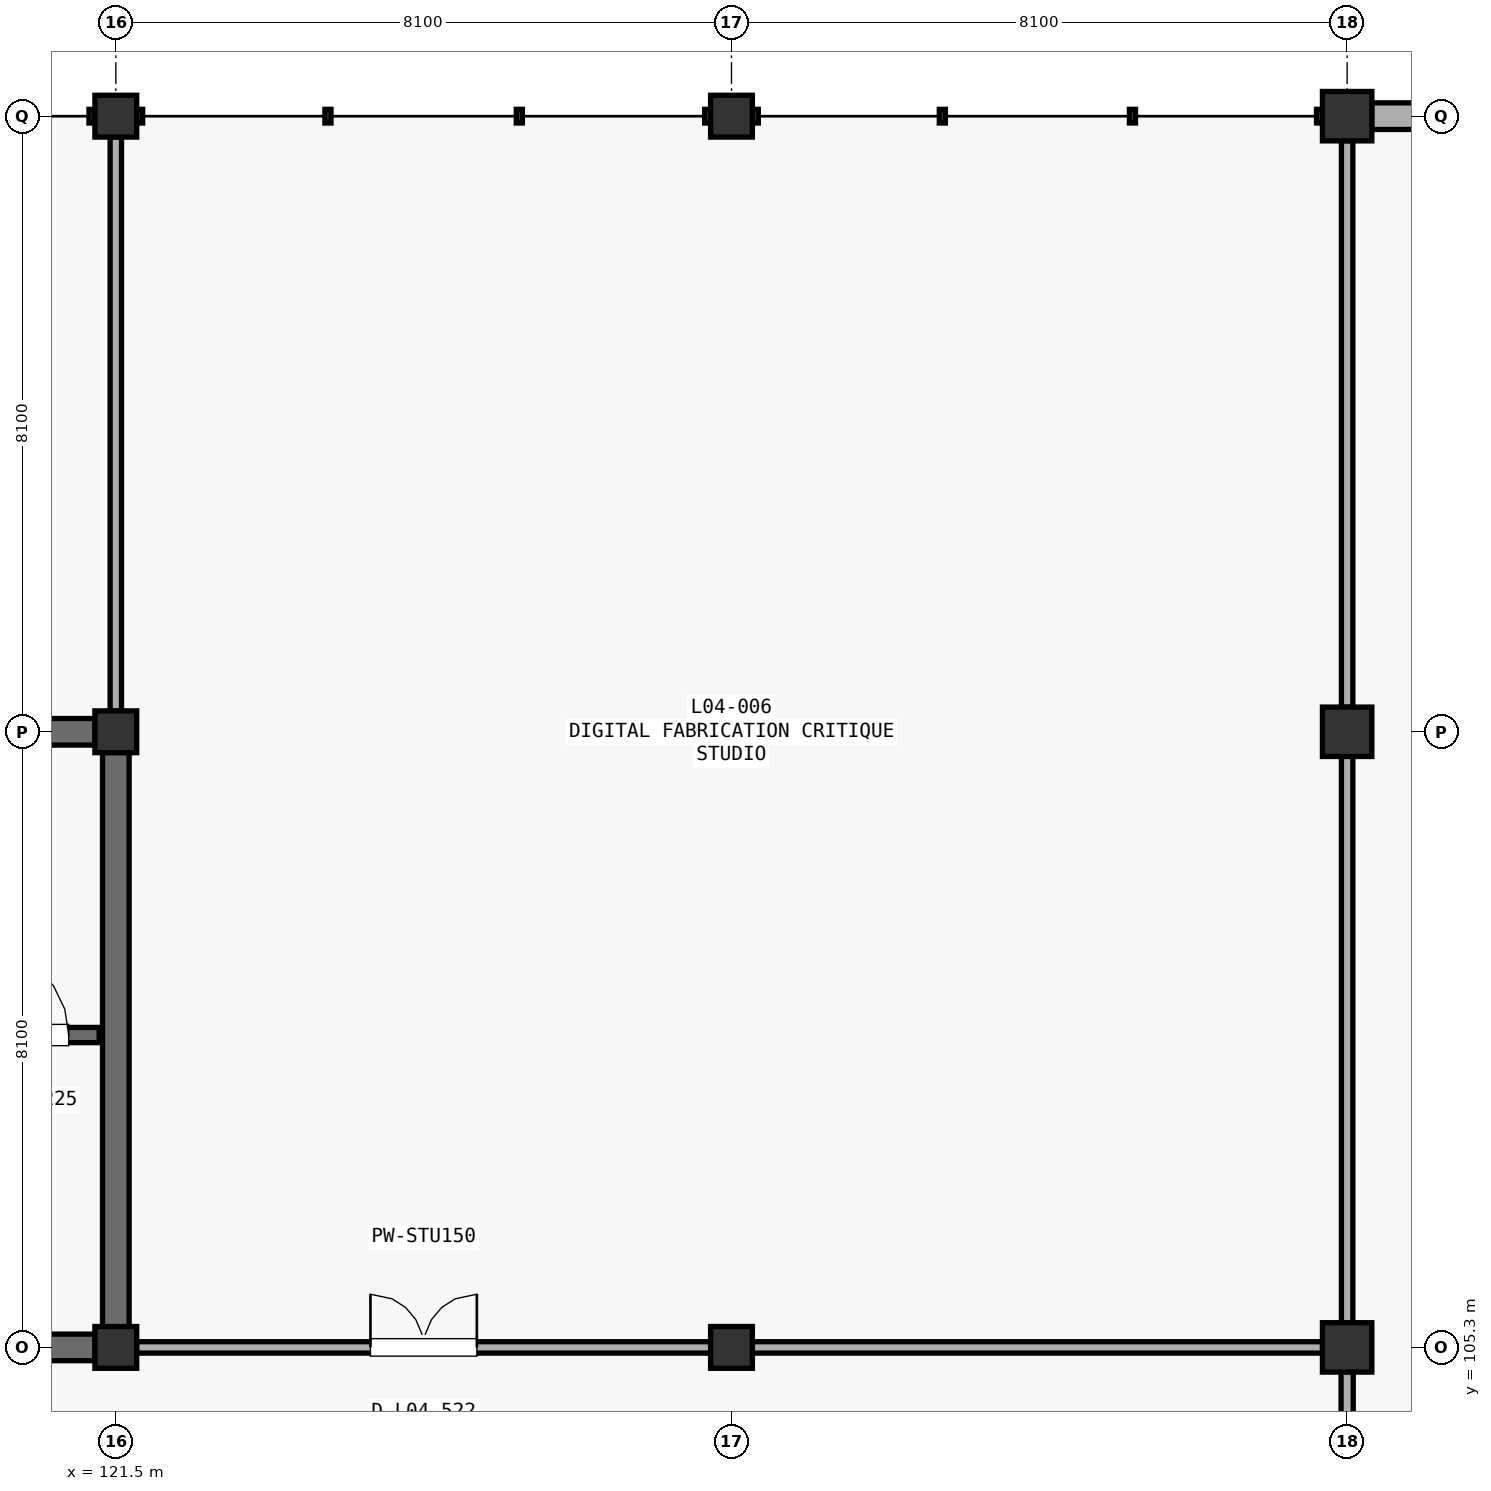
"""IFC4 building model, lengths in metres.
Left out: names, types, materials, properties, quantities, classifications, styles, units other than length and angle.
Written with IfcOpenShell. Run it as: python <this file> out.ifc"""

import sys

from ifc_helpers import new_model, si_unit, direction, frame, frame_2d, origin, origin_2d, place, context, subcontext, project, spatial, rectangle, extrude, element, fill, save


model = new_model("IFC4")
c1 = context("Model", 3, precision=1e-05, world=origin(), true_north=direction((0.0, 1.0)))
c2 = subcontext(c1, "Body", "Model", "MODEL_VIEW")
j1 = project(units=[si_unit("LENGTHUNIT", "METRE"), si_unit("PLANEANGLEUNIT", "RADIAN")], contexts=[c1])
p1 = place(None, origin())
s1 = spatial("IfcSite", under=j1, at=p1, CompositionType="ELEMENT")
p2 = place(p1, origin())
s2 = spatial("IfcBuilding", under=s1, at=p2, CompositionType="ELEMENT")
p3 = place(p2, frame((0.0, 0.0, 18.53)))
s3 = spatial("IfcBuildingStorey", under=s2, at=p3, CompositionType="ELEMENT", Elevation=18.53)
for number, where, z_axis, x_axis in (
    (1, (121.5, 105.3, 0.0), (0.0, 0.0, 1.0), (1.0, 0.0, 0.0)),
    (2, (121.5, 113.4, 0.0), (0.0, 0.0, 1.0), (1.0, 0.0, 0.0)),
    (3, (121.5, 121.5, 0.0), (0.0, 0.0, 1.0), (1.0, 0.0, 0.0)),
    (4, (129.6, 105.3, 0.0), (0.0, 0.0, 1.0), (1.0, 0.0, 0.0)),
    (5, (129.6, 113.4, 0.0), (0.0, 0.0, 1.0), (1.0, 0.0, 0.0)),
    (6, (129.6, 121.5, 0.0), (0.0, 0.0, 1.0), (1.0, 0.0, 0.0)),
):
    element("IfcColumn", number, at=place(p3, frame(where, z_axis=z_axis, x_axis=x_axis)), inside=s3, PredefinedType="COLUMN", context=c2, shape_type="SweptSolid", body=[
        extrude(rectangle(XDim=0.55, YDim=0.55, at=origin_2d()), origin(), (0.0, 0.0, 1.0), 4.42),
    ])
for number, where, z_axis, x_axis in (
    (7, (137.7, 105.3, 0.0), (0.0, 0.0, 1.0), (1.0, 0.0, 0.0)),
    (8, (137.7, 113.4, 0.0), (0.0, 0.0, 1.0), (1.0, 0.0, 0.0)),
    (9, (137.7, 121.5, 0.0), (0.0, 0.0, 1.0), (1.0, 0.0, 0.0)),
):
    element("IfcColumn", number, at=place(p3, frame(where, z_axis=z_axis, x_axis=x_axis)), inside=s3, PredefinedType="COLUMN", context=c2, shape_type="SweptSolid", body=[
        extrude(rectangle(XDim=0.65, YDim=0.65, at=origin_2d()), origin(), (0.0, 0.0, 1.0), 4.42),
    ])
p4 = place(p3, frame((138.023, 121.5, 0.0), z_axis=(0.0, 0.0, 1.0), x_axis=(1.0, 0.0, 0.0)))
e10 = element("IfcWall", 10, at=p4, inside=s3, PredefinedType="STANDARD", context=c2, shape_type="SweptSolid", body=[
    extrude(rectangle(XDim=7.454, YDim=0.35, at=frame_2d((3.727, 0.0))), origin(), (0.0, 0.0, 1.0), 3.562),
])
p5 = place(p4, frame((2.077, 0.0, 0.85)))
e11 = element("IfcOpeningElement", 11, at=p5, cuts=e10, PredefinedType="OPENING", context=c2, shape_type="SweptSolid", body=[
    extrude(rectangle(XDim=3.3, YDim=1.8, at=frame_2d((1.65, 0.9))), frame((0.0, 0.185, 0.0), z_axis=(0.0, -1.0, 0.0), x_axis=(1.0, 0.0, 0.0)), (0.0, 0.0, 1.0), 0.37),
])
for number, where, z_axis, x_axis in (
    (12, (113.673, 113.4, 0.0), (0.0, 0.0, 1.0), (1.0, 0.0, 0.0)),
    (13, (121.5, 105.573, 0.0), (0.0, 0.0, 1.0), (0.0, 1.0, 0.0)),
):
    element("IfcWall", number, at=place(p3, frame(where, z_axis=z_axis, x_axis=x_axis)), inside=s3, PredefinedType="SHEAR", context=c2, shape_type="SweptSolid", body=[
        extrude(rectangle(XDim=7.554, YDim=0.35, at=frame_2d((3.777, 0.0))), origin(), (0.0, 0.0, 1.0), 4.162),
    ])
p6 = place(p3, frame((113.673, 105.3, 0.0), z_axis=(0.0, 0.0, 1.0), x_axis=(1.0, 0.0, 0.0)))
e14 = element("IfcWall", 14, at=p6, inside=s3, PredefinedType="SHEAR", context=c2, shape_type="SweptSolid", body=[
    extrude(rectangle(XDim=7.554, YDim=0.35, at=frame_2d((3.777, 0.0))), origin(), (0.0, 0.0, 1.0), 4.162),
])
p7 = place(p6, frame((5.304, 0.0, 0.0)))
e15 = element("IfcOpeningElement", 15, at=p7, cuts=e14, PredefinedType="OPENING", context=c2, shape_type="SweptSolid", body=[
    extrude(rectangle(XDim=1.2, YDim=2.2, at=frame_2d((0.6, 1.1))), frame((0.0, 0.185, 0.0), z_axis=(0.0, -1.0, 0.0), x_axis=(1.0, 0.0, 0.0)), (0.0, 0.0, 1.0), 0.37),
])
p8 = place(p3, frame((113.62, 109.41, 0.0), z_axis=(0.0, 0.0, 1.0), x_axis=(1.0, 0.0, 0.0)))
e16 = element("IfcWall", 16, at=p8, inside=s3, PredefinedType="SHEAR", context=c2, shape_type="SweptSolid", body=[
    extrude(rectangle(XDim=7.66, YDim=0.2, at=frame_2d((3.83, 0.0))), origin(), (0.0, 0.0, 1.0), 4.162),
])
p9 = place(p8, frame((6.11, 0.0, 0.0)))
e17 = element("IfcOpeningElement", 17, at=p9, cuts=e16, PredefinedType="OPENING", context=c2, shape_type="SweptSolid", body=[
    extrude(rectangle(XDim=1.15, YDim=2.2, at=frame_2d((0.575, 1.1))), frame((0.0, 0.11, 0.0), z_axis=(0.0, -1.0, 0.0), x_axis=(1.0, 0.0, 0.0)), (0.0, 0.0, 1.0), 0.22),
])
p10 = place(p3, frame((121.773, 105.3, 0.0), z_axis=(0.0, 0.0, 1.0), x_axis=(1.0, 0.0, 0.0)))
e18 = element("IfcWall", 18, at=p10, inside=s3, PredefinedType="PARTITIONING", context=c2, shape_type="SweptSolid", body=[
    extrude(rectangle(XDim=7.554, YDim=0.15, at=frame_2d((3.777, 0.0))), origin(), (0.0, 0.0, 1.0), 3.312),
])
p11 = place(p10, frame((3.077, 0.0, 0.0)))
e19 = element("IfcOpeningElement", 19, at=p11, cuts=e18, PredefinedType="OPENING", context=c2, shape_type="SweptSolid", body=[
    extrude(rectangle(XDim=1.4, YDim=2.2, at=frame_2d((0.7, 1.1))), frame((0.0, 0.085, 0.0), z_axis=(0.0, -1.0, 0.0), x_axis=(1.0, 0.0, 0.0)), (0.0, 0.0, 1.0), 0.17),
])
p12 = place(p3, frame((129.873, 105.3, 0.0), z_axis=(0.0, 0.0, 1.0), x_axis=(1.0, 0.0, 0.0)))
e20 = element("IfcWall", 20, at=p12, inside=s3, PredefinedType="PARTITIONING", context=c2, shape_type="SweptSolid", body=[
    extrude(rectangle(XDim=7.504, YDim=0.15, at=frame_2d((3.752, 0.0))), origin(), (0.0, 0.0, 1.0), 3.212),
])
p13 = place(p3, frame((137.7, 105.623, 0.0), z_axis=(0.0, 0.0, 1.0), x_axis=(0.0, 1.0, 0.0)))
e21 = element("IfcWall", 21, at=p13, inside=s3, PredefinedType="PARTITIONING", context=c2, shape_type="SweptSolid", body=[
    extrude(rectangle(XDim=7.454, YDim=0.15, at=frame_2d((3.727, 0.0))), origin(), (0.0, 0.0, 1.0), 3.562),
])
p14 = place(p3, frame((137.7, 113.723, 0.0), z_axis=(0.0, 0.0, 1.0), x_axis=(0.0, 1.0, 0.0)))
e22 = element("IfcWall", 22, at=p14, inside=s3, PredefinedType="PARTITIONING", context=c2, shape_type="SweptSolid", body=[
    extrude(rectangle(XDim=7.454, YDim=0.15, at=frame_2d((3.727, 0.0))), origin(), (0.0, 0.0, 1.0), 3.312),
])
p15 = place(p3, frame((121.5, 113.673, 0.0), z_axis=(0.0, 0.0, 1.0), x_axis=(0.0, 1.0, 0.0)))
e23 = element("IfcWall", 23, at=p15, inside=s3, PredefinedType="PARTITIONING", context=c2, shape_type="SweptSolid", body=[
    extrude(rectangle(XDim=7.554, YDim=0.15, at=frame_2d((3.777, 0.0))), origin(), (0.0, 0.0, 1.0), 3.212),
])
p16 = place(p3, frame((137.7, 97.523, 0.0), z_axis=(0.0, 0.0, 1.0), x_axis=(0.0, 1.0, 0.0)))
e24 = element("IfcWall", 24, at=p16, inside=s3, PredefinedType="PARTITIONING", context=c2, shape_type="SweptSolid", body=[
    extrude(rectangle(XDim=7.454, YDim=0.16, at=frame_2d((3.727, 0.0))), origin(), (0.0, 0.0, 1.0), 3.512),
])
p17 = place(p9, origin())
e25 = element("IfcDoor", 25, at=p17, inside=s3, OperationType="SINGLE_SWING_LEFT", PredefinedType="DOOR", context=c2, shape_type="SweptSolid", body=[
    extrude(rectangle(XDim=1.15, YDim=2.2, at=frame_2d((0.575, 1.1))), frame((0.0, 0.025, 0.0), z_axis=(0.0, -1.0, 0.0), x_axis=(1.0, 0.0, 0.0)), (0.0, 0.0, 1.0), 0.05),
])
fill(e17, e25)
p18 = place(p11, origin())
e26 = element("IfcDoor", 26, at=p18, inside=s3, OperationType="DOUBLE_SWING_LEFT", PredefinedType="DOOR", context=c2, shape_type="SweptSolid", body=[
    extrude(rectangle(XDim=1.4, YDim=2.2, at=frame_2d((0.7, 1.1))), frame((0.0, 0.025, 0.0), z_axis=(0.0, -1.0, 0.0), x_axis=(1.0, 0.0, 0.0)), (0.0, 0.0, 1.0), 0.05),
])
fill(e19, e26)
save(model, sys.argv[1])
